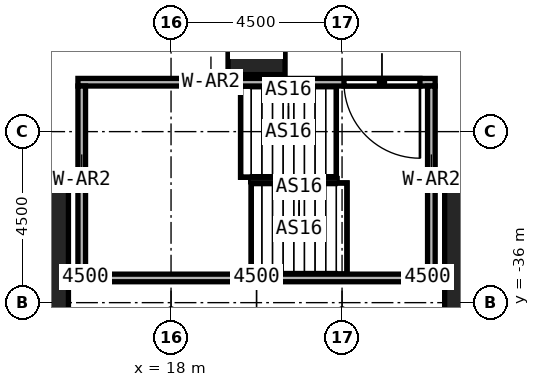
"""IFC4 building model, lengths in metres.
Left out: names, types, materials, properties, quantities, classifications, styles, units other than length and angle.
Written with IfcOpenShell. Run it as: python <this file> out.ifc"""

import sys

from ifc_helpers import new_model, si_unit, direction, frame, frame_2d, origin, origin_2d, place, context, subcontext, project, spatial, rectangle, extrude, element, fill, save


model = new_model("IFC4")
c1 = context("Model", 3, precision=1e-05, world=origin(), true_north=direction((0.0, 1.0)))
c2 = subcontext(c1, "Body", "Model", "MODEL_VIEW")
j1 = project(units=[si_unit("LENGTHUNIT", "METRE"), si_unit("PLANEANGLEUNIT", "RADIAN")], contexts=[c1])
p1 = place(None, origin())
s1 = spatial("IfcSite", under=j1, at=p1, CompositionType="ELEMENT")
p2 = place(p1, origin())
s2 = spatial("IfcBuilding", under=s1, at=p2, CompositionType="ELEMENT")
p3 = place(p2, frame((0.0, 0.0, 25.0)))
s3 = spatial("IfcBuildingStorey", under=s2, at=p3, CompositionType="ELEMENT", Elevation=25.0)
for number, where, z_axis, x_axis in (
    (1, (13.5, -36.0, 0.0), (0.0, 0.0, 1.0), (1.0, 0.0, 0.0)),
    (2, (27.0, -36.0, 0.0), (0.0, 0.0, 1.0), (1.0, 0.0, 0.0)),
):
    element("IfcColumn", number, at=place(p3, frame(where, z_axis=z_axis, x_axis=x_axis)), inside=s3, PredefinedType="COLUMN", context=c2, shape_type="SweptSolid", body=[
        extrude(rectangle(XDim=3.6, YDim=6.0, at=origin_2d()), origin(), (0.0, 0.0, 1.0), 6.0),
    ])
p4 = place(p3, frame((20.25, -29.25, 0.0), z_axis=(0.0, 0.0, 1.0), x_axis=(1.0, 0.0, 0.0)))
e3 = element("IfcColumn", 3, at=p4, inside=s3, PredefinedType="COLUMN", context=c2, shape_type="SweptSolid", body=[
    extrude(rectangle(XDim=1.5, YDim=1.5, at=origin_2d()), origin(), (0.0, 0.0, 1.0), 6.0),
])
p5 = place(p3, frame((24.95, -30.2, 0.0), z_axis=(0.0, 0.0, 1.0), x_axis=(-1.0, 0.0, 0.0)))
e4 = element("IfcWall", 4, at=p5, inside=s3, PredefinedType="SOLIDWALL", context=c2, shape_type="SweptSolid", body=[
    extrude(rectangle(XDim=9.4, YDim=0.2, at=frame_2d((4.7, 0.0))), origin(), (0.0, 0.0, 1.0), 6.0),
])
p6 = place(p5, frame((0.4, 0.0, 0.0)))
e5 = element("IfcOpeningElement", 5, at=p6, cuts=e4, PredefinedType="OPENING", context=c2, shape_type="SweptSolid", body=[
    extrude(rectangle(XDim=2.0, YDim=2.4, at=frame_2d((1.0, 1.2))), frame((0.0, 0.1, 0.0), z_axis=(0.0, -1.0, 0.0), x_axis=(1.0, 0.0, 0.0)), (0.0, 0.0, 1.0), 0.2),
])
p7 = place(p3, frame((15.55, -35.35, 0.0), z_axis=(0.0, 0.0, 1.0), x_axis=(1.0, 0.0, 0.0)))
e6 = element("IfcWall", 6, at=p7, inside=s3, PredefinedType="SOLIDWALL", context=c2, shape_type="SweptSolid", body=[
    extrude(rectangle(XDim=9.4, YDim=0.2, at=frame_2d((4.7, 0.0))), origin(), (0.0, 0.0, 1.0), 6.0),
])
for number, where, z_axis, x_axis in (
    (7, (15.65, -35.25, 0.0), (0.0, 0.0, 1.0), (0.0, 1.0, 0.0)),
    (8, (24.85, -35.25, 0.0), (0.0, 0.0, 1.0), (0.0, 1.0, 0.0)),
):
    element("IfcWall", number, at=place(p3, frame(where, z_axis=z_axis, x_axis=x_axis)), inside=s3, PredefinedType="SOLIDWALL", context=c2, shape_type="SweptSolid", body=[
        extrude(rectangle(XDim=4.95, YDim=0.2, at=frame_2d((2.475, 0.0))), origin(), (0.0, 0.0, 1.0), 6.0),
    ])
p8 = place(p6, origin())
e9 = element("IfcDoor", 9, at=p8, inside=s3, OperationType="DOUBLE_DOOR_SINGLE_SWING", PredefinedType="DOOR", context=c2, shape_type="SweptSolid", body=[
    extrude(rectangle(XDim=2.0, YDim=2.4, at=frame_2d((1.0, 1.2))), frame((0.0, 0.025, 0.0), z_axis=(0.0, -1.0, 0.0), x_axis=(1.0, 0.0, 0.0)), (0.0, 0.0, 1.0), 0.05),
])
fill(e5, e9)
save(model, sys.argv[1])
